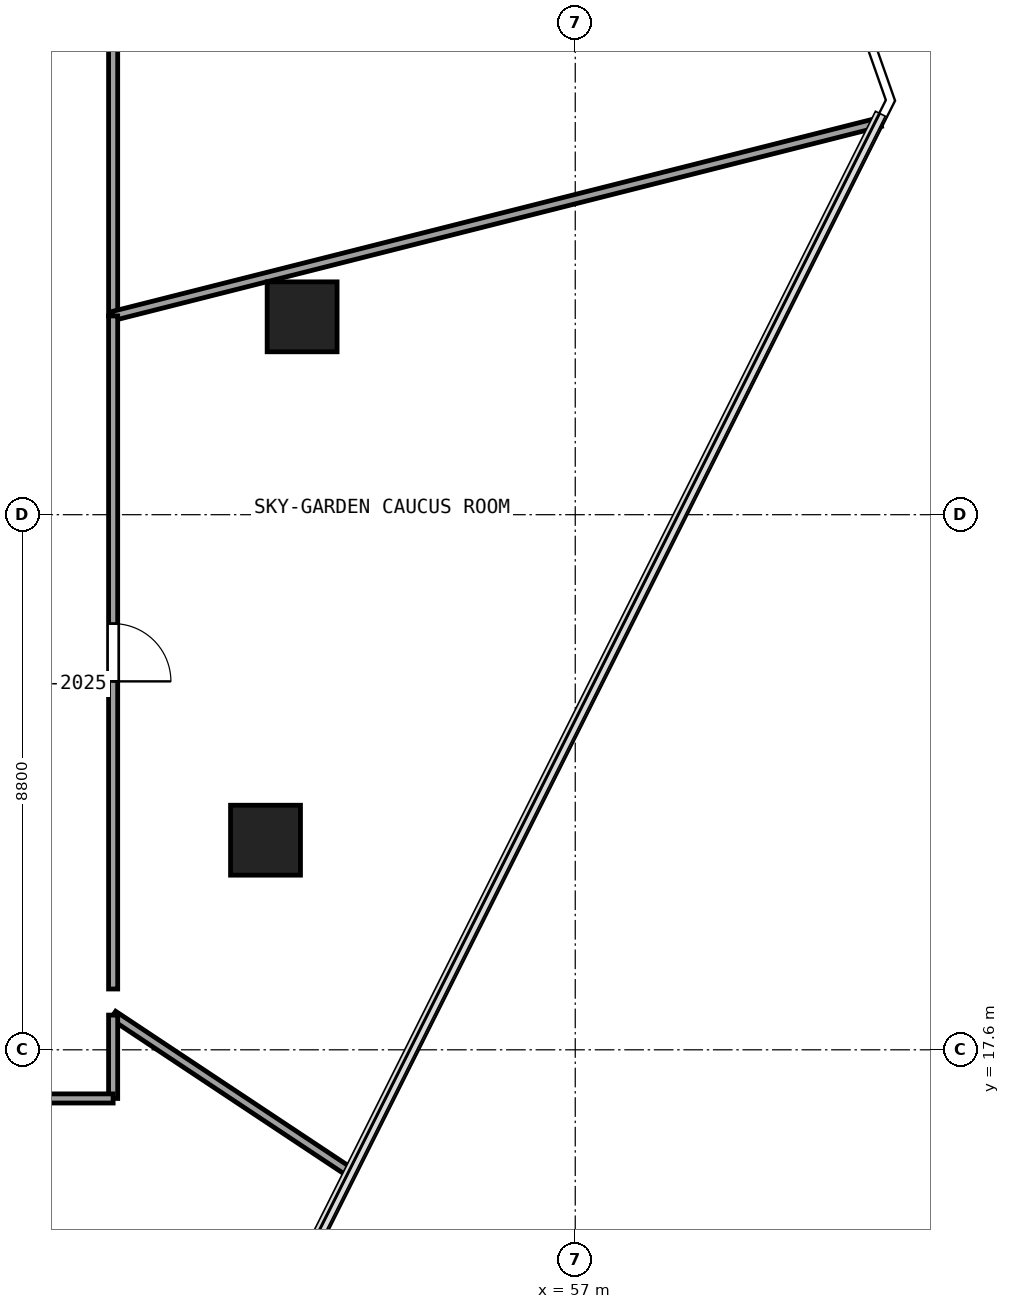
"""IFC4 building model, lengths in metres.
Left out: names, types, materials, properties, quantities, classifications, styles, units other than length and angle.
Written with IfcOpenShell. Run it as: python <this file> out.ifc"""

import sys

from ifc_helpers import new_model, si_unit, direction, frame, frame_2d, origin, origin_2d, place, context, subcontext, project, spatial, rectangle, extrude, element, fill, save


model = new_model("IFC4")
c1 = context("Model", 3, precision=1e-05, world=origin(), true_north=direction((0.0, 1.0)))
c2 = subcontext(c1, "Body", "Model", "MODEL_VIEW")
j1 = project(units=[si_unit("LENGTHUNIT", "METRE"), si_unit("PLANEANGLEUNIT", "RADIAN")], contexts=[c1])
p1 = place(None, origin())
s1 = spatial("IfcSite", under=j1, at=p1, CompositionType="ELEMENT")
p2 = place(p1, origin())
s2 = spatial("IfcBuilding", under=s1, at=p2, CompositionType="ELEMENT")
p3 = place(p2, frame((0.0, 0.0, 79.8)))
s3 = spatial("IfcBuildingStorey", under=s2, at=p3, CompositionType="ELEMENT", Elevation=79.8)
for number, where, z_axis, x_axis in (
    (1, (52.508, 29.654, 0.0), (0.0, 0.0, 1.0), (1.0, 0.0, 0.0)),
    (2, (51.906, 21.047, 0.0), (0.0, 0.0, 1.0), (1.0, 0.0, 0.0)),
):
    element("IfcColumn", number, at=place(p3, frame(where, z_axis=z_axis, x_axis=x_axis)), inside=s3, PredefinedType="COLUMN", context=c2, shape_type="SweptSolid", body=[
        extrude(rectangle(XDim=1.15, YDim=1.15, at=origin_2d()), origin(), (0.0, 0.0, 1.0), 3.17),
    ])
p4 = place(p3, frame((49.4, 34.2, 0.0), z_axis=(0.0, 0.0, 1.0), x_axis=(0.0, -1.0, 0.0)))
e3 = element("IfcWall", 3, at=p4, inside=s3, PredefinedType="PARTITIONING", context=c2, shape_type="SweptSolid", body=[
    extrude(rectangle(XDim=4.531, YDim=0.15, at=frame_2d((2.266, 0.0))), origin(), (0.0, 0.0, 1.0), 2.455),
])
p5 = place(p3, frame((49.4, 29.669, 0.0), z_axis=(0.0, 0.0, 1.0), x_axis=(0.969530283496, 0.244971486879, 0.0)))
e4 = element("IfcWall", 4, at=p5, inside=s3, PredefinedType="PARTITIONING", context=c2, shape_type="SweptSolid", body=[
    extrude(rectangle(XDim=13.014, YDim=0.15, at=frame_2d((6.507, 0.0))), origin(), (0.0, 0.0, 1.0), 2.455),
])
p6 = place(p3, frame((53.322, 15.568, 0.0), z_axis=(0.0, 0.0, 1.0), x_axis=(-0.833221395331, 0.5529395142, 0.0)))
e5 = element("IfcWall", 5, at=p6, inside=s3, PredefinedType="PARTITIONING", context=c2, shape_type="SweptSolid", body=[
    extrude(rectangle(XDim=4.707, YDim=0.15, at=frame_2d((2.354, 0.0))), origin(), (0.0, 0.0, 1.0), 3.17),
])
p7 = place(p3, frame((49.4, 18.171, 0.0), z_axis=(0.0, 0.0, 1.0), x_axis=(0.0, -1.0, 0.0)))
e6 = element("IfcWall", 6, at=p7, inside=s3, PredefinedType="PARTITIONING", context=c2, shape_type="SweptSolid", body=[
    extrude(rectangle(XDim=1.371, YDim=0.15, at=frame_2d((0.686, 0.0))), origin(), (0.0, 0.0, 1.0), 3.17),
])
p8 = place(p3, frame((49.4, 16.8, 0.0), z_axis=(0.0, 0.0, 1.0), x_axis=(-1.0, 0.0, 0.0)))
e7 = element("IfcWall", 7, at=p8, inside=s3, PredefinedType="PARTITIONING", context=c2, shape_type="SweptSolid", body=[
    extrude(rectangle(XDim=11.191, YDim=0.15, at=frame_2d((5.595, 0.0))), origin(), (0.0, 0.0, 1.0), 2.455),
])
p9 = place(p8, frame((5.12, 0.0, 0.0)))
e8 = element("IfcOpeningElement", 8, at=p9, cuts=e7, PredefinedType="OPENING", context=c2, shape_type="SweptSolid", body=[
    extrude(rectangle(XDim=0.95, YDim=2.15, at=frame_2d((0.475, 1.075))), frame((0.0, 0.085, 0.0), z_axis=(0.0, -1.0, 0.0), x_axis=(1.0, 0.0, 0.0)), (0.0, 0.0, 1.0), 0.17),
])
p10 = place(p3, frame((49.4, 29.669, 0.0), z_axis=(0.0, 0.0, 1.0), x_axis=(0.0, -1.0, 0.0)))
e9 = element("IfcWall", 9, at=p10, inside=s3, PredefinedType="PARTITIONING", context=c2, shape_type="SweptSolid", body=[
    extrude(rectangle(XDim=11.069, YDim=0.15, at=frame_2d((5.534, 0.0))), origin(), (0.0, 0.0, 1.0), 2.455),
])
p11 = place(p10, frame((5.06, 0.0, 0.0)))
e10 = element("IfcOpeningElement", 10, at=p11, cuts=e9, PredefinedType="OPENING", context=c2, shape_type="SweptSolid", body=[
    extrude(rectangle(XDim=0.95, YDim=2.15, at=frame_2d((0.475, 1.075))), frame((0.0, 0.085, 0.0), z_axis=(0.0, -1.0, 0.0), x_axis=(1.0, 0.0, 0.0)), (0.0, 0.0, 1.0), 0.17),
])
p12 = place(p11, origin())
e11 = element("IfcDoor", 11, at=p12, inside=s3, OperationType="SINGLE_SWING_RIGHT", PredefinedType="DOOR", context=c2, shape_type="SweptSolid", body=[
    extrude(rectangle(XDim=0.95, YDim=2.15, at=frame_2d((0.475, 1.075))), frame((0.0, 0.025, 0.0), z_axis=(0.0, -1.0, 0.0), x_axis=(1.0, 0.0, 0.0)), (0.0, 0.0, 1.0), 0.05),
])
fill(e10, e11)
save(model, sys.argv[1])
